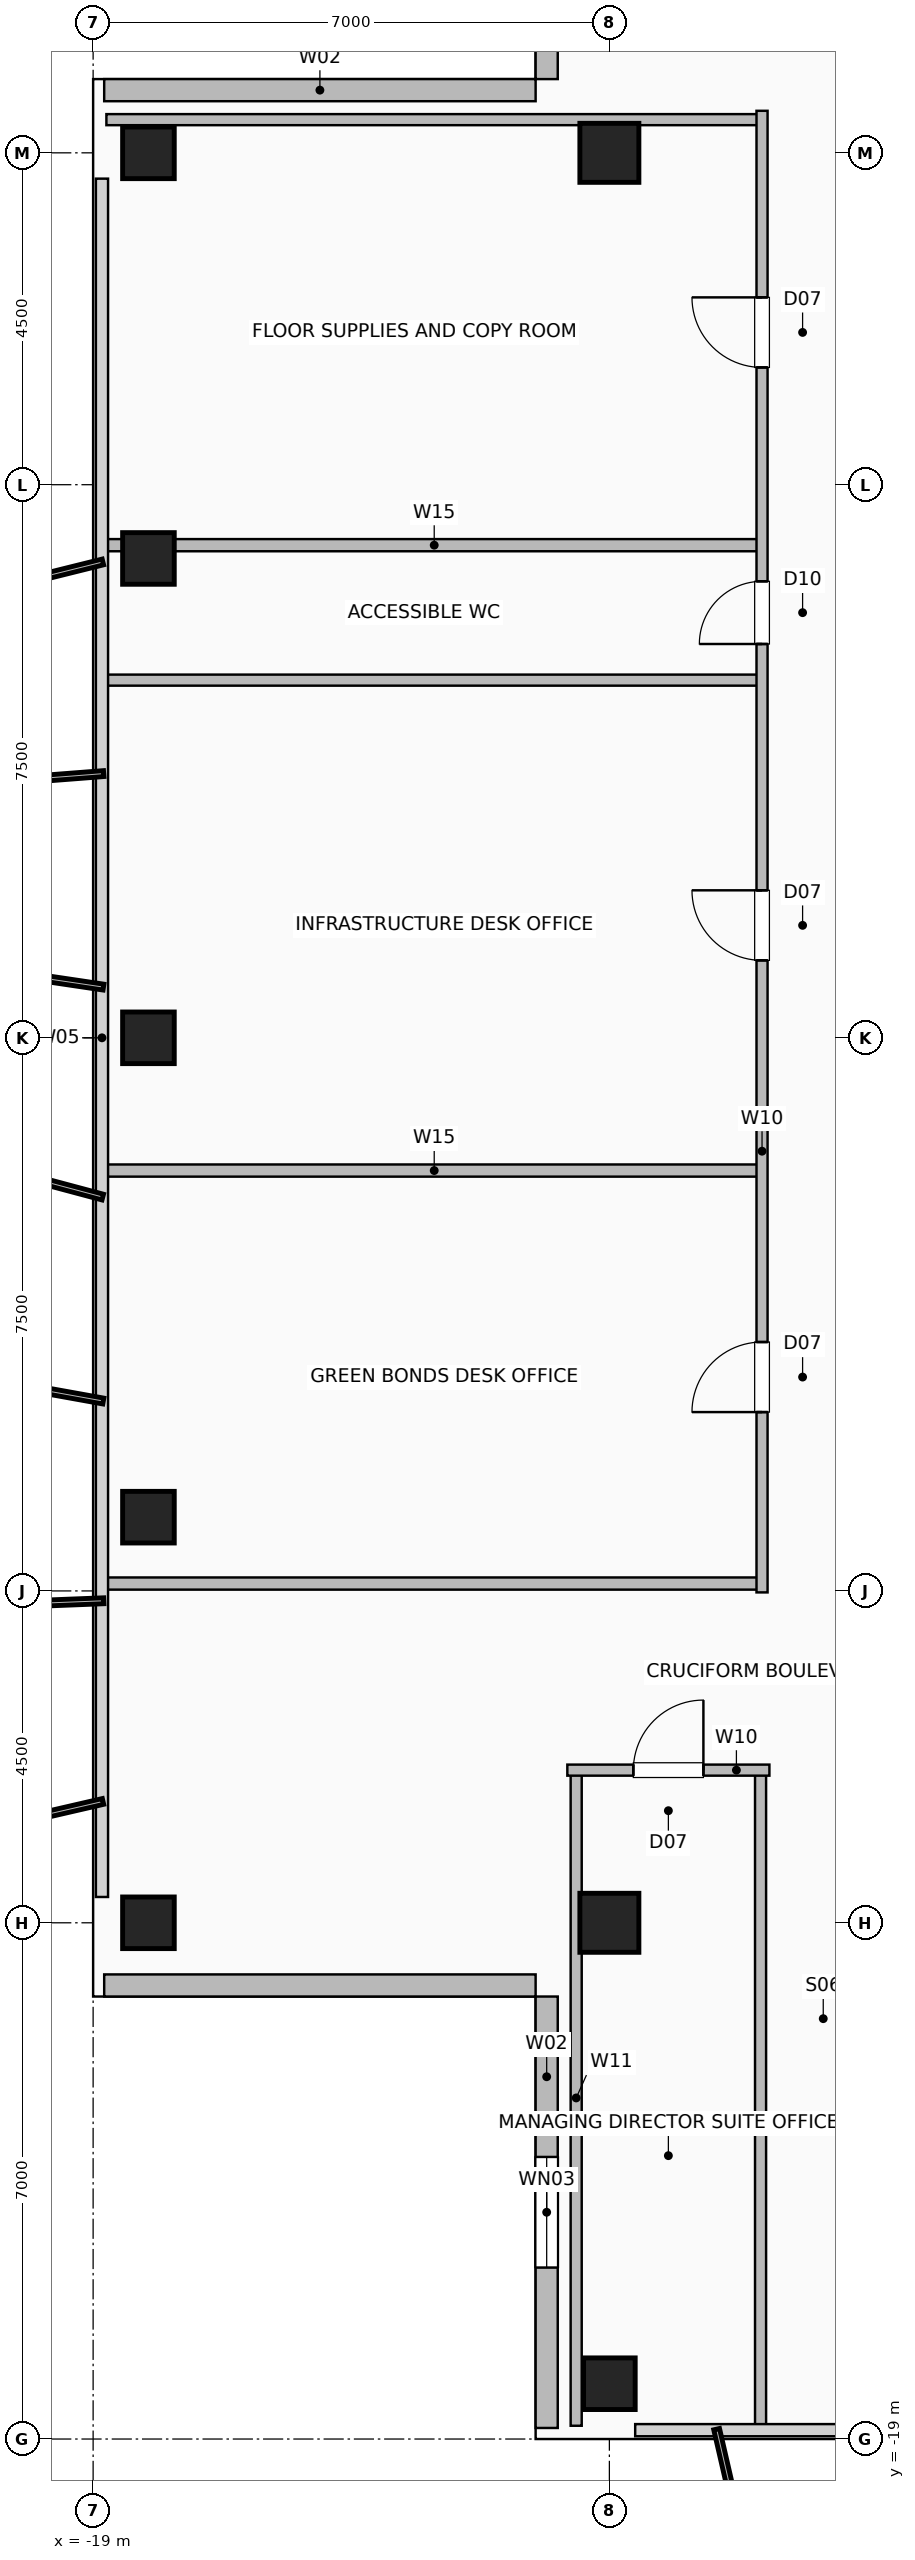
"""IFC4 building model, lengths in metres.
Left out: names, types, materials, properties, quantities, classifications, styles, units other than length and angle.
Written with IfcOpenShell. Run it as: python <this file> out.ifc"""

import sys

from ifc_helpers import new_model, si_unit, direction, frame, frame_2d, origin, origin_2d, place, context, subcontext, project, spatial, rectangle, hollow_rectangle, extrude, element, fill, save


model = new_model("IFC4")
c1 = context("Model", 3, precision=1e-05, world=origin(), true_north=direction((0.0, 1.0)))
c2 = subcontext(c1, "Body", "Model", "MODEL_VIEW")
j1 = project(units=[si_unit("LENGTHUNIT", "METRE"), si_unit("PLANEANGLEUNIT", "RADIAN")], contexts=[c1])
p1 = place(None, origin())
s1 = spatial("IfcSite", under=j1, at=p1, CompositionType="ELEMENT")
p2 = place(p1, origin())
s2 = spatial("IfcBuilding", under=s1, at=p2, CompositionType="ELEMENT")
p3 = place(p2, frame((0.0, 0.0, 282.8)))
s3 = spatial("IfcBuildingStorey", under=s2, at=p3, CompositionType="ELEMENT", Elevation=282.8)
for number, where, z_axis, x_axis in (
    (1, (-12.0, -18.25, 0.0), (0.0, 0.0, 1.0), (1.0, 0.0, 0.0)),
    (2, (-18.25, -12.0, 0.0), (0.0, 0.0, 1.0), (1.0, 0.0, 0.0)),
    (3, (-18.25, -6.5, 0.0), (0.0, 0.0, 1.0), (1.0, 0.0, 0.0)),
    (4, (-18.25, 0.0, 0.0), (0.0, 0.0, 1.0), (1.0, 0.0, 0.0)),
    (5, (-18.25, 6.5, 0.0), (0.0, 0.0, 1.0), (1.0, 0.0, 0.0)),
    (6, (-18.25, 12.0, 0.0), (0.0, 0.0, 1.0), (1.0, 0.0, 0.0)),
):
    element("IfcColumn", number, at=place(p3, frame(where, z_axis=z_axis, x_axis=x_axis)), inside=s3, PredefinedType="COLUMN", context=c2, shape_type="SweptSolid", body=[
        extrude(hollow_rectangle(XDim=0.7, YDim=0.7, WallThickness=0.035, at=origin_2d()), origin(), (0.0, 0.0, 1.0), 3.6),
    ])
for number, where, z_axis, x_axis in (
    (7, (-12.0, -12.0, 0.0), (0.0, 0.0, 1.0), (1.0, 0.0, 0.0)),
    (8, (-12.0, 12.0, 0.0), (0.0, 0.0, 1.0), (1.0, 0.0, 0.0)),
):
    element("IfcColumn", number, at=place(p3, frame(where, z_axis=z_axis, x_axis=x_axis)), inside=s3, PredefinedType="COLUMN", context=c2, shape_type="SweptSolid", body=[
        extrude(hollow_rectangle(XDim=0.8, YDim=0.8, WallThickness=0.04, at=origin_2d()), origin(), (0.0, 0.0, 1.0), 3.6),
    ])
p4 = place(p3, frame((-12.85, -18.85, 0.0), z_axis=(0.0, 0.0, 1.0), x_axis=(0.0, 1.0, 0.0)))
e9 = element("IfcWall", 9, at=p4, inside=s3, PredefinedType="SOLIDWALL", context=c2, shape_type="SweptSolid", body=[
    extrude(rectangle(XDim=5.85, YDim=0.3, at=frame_2d((2.925, 0.0))), origin(), (0.0, 0.0, 1.0), 3.36),
])
p5 = place(p4, frame((2.175, 0.0, 0.9)))
e10 = element("IfcOpeningElement", 10, at=p5, cuts=e9, PredefinedType="OPENING", context=c2, shape_type="SweptSolid", body=[
    extrude(rectangle(XDim=1.5, YDim=1.8, at=frame_2d((0.75, 0.9))), frame((0.0, 0.16, 0.0), z_axis=(0.0, -1.0, 0.0), x_axis=(1.0, 0.0, 0.0)), (0.0, 0.0, 1.0), 0.32),
])
p6 = place(p3, frame((-18.85, -12.85, 0.0), z_axis=(0.0, 0.0, 1.0), x_axis=(1.0, 0.0, 0.0)))
e11 = element("IfcWall", 11, at=p6, inside=s3, PredefinedType="SOLIDWALL", context=c2, shape_type="SweptSolid", body=[
    extrude(rectangle(XDim=5.85, YDim=0.3, at=frame_2d((2.925, 0.0))), origin(), (0.0, 0.0, 1.0), 3.36),
])
p7 = place(p3, frame((-12.85, 18.85, 0.0), z_axis=(0.0, 0.0, 1.0), x_axis=(0.0, -1.0, 0.0)))
e12 = element("IfcWall", 12, at=p7, inside=s3, PredefinedType="SOLIDWALL", context=c2, shape_type="SweptSolid", body=[
    extrude(rectangle(XDim=5.85, YDim=0.3, at=frame_2d((2.925, 0.0))), origin(), (0.0, 0.0, 1.0), 3.36),
])
p8 = place(p7, frame((2.175, 0.0, 0.9)))
e13 = element("IfcOpeningElement", 13, at=p8, cuts=e12, PredefinedType="OPENING", context=c2, shape_type="SweptSolid", body=[
    extrude(rectangle(XDim=1.5, YDim=1.8, at=frame_2d((0.75, 0.9))), frame((0.0, 0.16, 0.0), z_axis=(0.0, -1.0, 0.0), x_axis=(1.0, 0.0, 0.0)), (0.0, 0.0, 1.0), 0.32),
])
p9 = place(p3, frame((-18.85, 12.85, 0.0), z_axis=(0.0, 0.0, 1.0), x_axis=(1.0, 0.0, 0.0)))
e14 = element("IfcWall", 14, at=p9, inside=s3, PredefinedType="SOLIDWALL", context=c2, shape_type="SweptSolid", body=[
    extrude(rectangle(XDim=5.85, YDim=0.3, at=frame_2d((2.925, 0.0))), origin(), (0.0, 0.0, 1.0), 3.36),
])
for number, where, z_axis, x_axis in (
    (15, (-12.45, -18.82, 0.0), (0.0, 0.0, 1.0), (0.0, 1.0, 0.0)),
    (16, (-9.95, -18.82, 0.0), (0.0, 0.0, 1.0), (0.0, 1.0, 0.0)),
):
    element("IfcWall", number, at=place(p3, frame(where, z_axis=z_axis, x_axis=x_axis)), inside=s3, PredefinedType="PARTITIONING", context=c2, shape_type="SweptSolid", body=[
        extrude(rectangle(XDim=8.89, YDim=0.15, at=frame_2d((4.445, 0.0))), origin(), (0.0, 0.0, 1.0), 3.36),
    ])
p10 = place(p3, frame((-12.57, -9.93, 0.0), z_axis=(0.0, 0.0, 1.0), x_axis=(1.0, 0.0, 0.0)))
e17 = element("IfcWall", 17, at=p10, inside=s3, PredefinedType="PARTITIONING", context=c2, shape_type="SweptSolid", body=[
    extrude(rectangle(XDim=2.74, YDim=0.15, at=frame_2d((1.37, 0.0))), origin(), (0.0, 0.0, 1.0), 3.36),
])
p11 = place(p10, frame((0.895, 0.0, 0.0)))
e18 = element("IfcOpeningElement", 18, at=p11, cuts=e17, PredefinedType="OPENING", context=c2, shape_type="SweptSolid", body=[
    extrude(rectangle(XDim=0.95, YDim=2.06, at=frame_2d((0.475, 1.03))), frame((0.0, 0.085, 0.0), z_axis=(0.0, -1.0, 0.0), x_axis=(1.0, 0.0, 0.0)), (0.0, 0.0, 1.0), 0.17),
])
for number, where, z_axis, x_axis in (
    (19, (-18.82, 6.68, 0.0), (0.0, 0.0, 1.0), (1.0, 0.0, 0.0)),
    (20, (-18.82, -7.4, 0.0), (0.0, 0.0, 1.0), (1.0, 0.0, 0.0)),
    (21, (-18.82, -1.8, 0.0), (0.0, 0.0, 1.0), (1.0, 0.0, 0.0)),
):
    element("IfcWall", number, at=place(p3, frame(where, z_axis=z_axis, x_axis=x_axis)), inside=s3, PredefinedType="PLUMBINGWALL", context=c2, shape_type="SweptSolid", body=[
        extrude(rectangle(XDim=8.89, YDim=0.165, at=frame_2d((4.445, 0.0))), origin(), (0.0, 0.0, 1.0), 3.36),
    ])
for number, where, z_axis, x_axis in (
    (22, (-18.82, 4.85, 0.0), (0.0, 0.0, 1.0), (1.0, 0.0, 0.0)),
    (23, (-18.82, 12.45, 0.0), (0.0, 0.0, 1.0), (1.0, 0.0, 0.0)),
):
    element("IfcWall", number, at=place(p3, frame(where, z_axis=z_axis, x_axis=x_axis)), inside=s3, PredefinedType="PARTITIONING", context=c2, shape_type="SweptSolid", body=[
        extrude(rectangle(XDim=8.89, YDim=0.15, at=frame_2d((4.445, 0.0))), origin(), (0.0, 0.0, 1.0), 3.36),
    ])
p12 = place(p3, frame((-9.93, -7.52, 0.0), z_axis=(0.0, 0.0, 1.0), x_axis=(0.0, 1.0, 0.0)))
e24 = element("IfcWall", 24, at=p12, inside=s3, PredefinedType="PARTITIONING", context=c2, shape_type="SweptSolid", body=[
    extrude(rectangle(XDim=20.09, YDim=0.15, at=frame_2d((10.045, 0.0))), origin(), (0.0, 0.0, 1.0), 3.36),
])
p13 = place(p12, frame((2.445, 0.0, 0.0)))
e25 = element("IfcOpeningElement", 25, at=p13, cuts=e24, PredefinedType="OPENING", context=c2, shape_type="SweptSolid", body=[
    extrude(rectangle(XDim=0.95, YDim=2.06, at=frame_2d((0.475, 1.03))), frame((0.0, 0.085, 0.0), z_axis=(0.0, -1.0, 0.0), x_axis=(1.0, 0.0, 0.0)), (0.0, 0.0, 1.0), 0.17),
])
p14 = place(p12, frame((8.57, 0.0, 0.0)))
e26 = element("IfcOpeningElement", 26, at=p14, cuts=e24, PredefinedType="OPENING", context=c2, shape_type="SweptSolid", body=[
    extrude(rectangle(XDim=0.95, YDim=2.06, at=frame_2d((0.475, 1.03))), frame((0.0, 0.085, 0.0), z_axis=(0.0, -1.0, 0.0), x_axis=(1.0, 0.0, 0.0)), (0.0, 0.0, 1.0), 0.17),
])
p15 = place(p12, frame((12.86, 0.0, 0.0)))
e27 = element("IfcOpeningElement", 27, at=p15, cuts=e24, PredefinedType="OPENING", context=c2, shape_type="SweptSolid", body=[
    extrude(rectangle(XDim=0.85, YDim=2.05, at=frame_2d((0.425, 1.025))), frame((0.0, 0.085, 0.0), z_axis=(0.0, -1.0, 0.0), x_axis=(1.0, 0.0, 0.0)), (0.0, 0.0, 1.0), 0.17),
])
p16 = place(p12, frame((16.61, 0.0, 0.0)))
e28 = element("IfcOpeningElement", 28, at=p16, cuts=e24, PredefinedType="OPENING", context=c2, shape_type="SweptSolid", body=[
    extrude(rectangle(XDim=0.95, YDim=2.06, at=frame_2d((0.475, 1.03))), frame((0.0, 0.085, 0.0), z_axis=(0.0, -1.0, 0.0), x_axis=(1.0, 0.0, 0.0)), (0.0, 0.0, 1.0), 0.17),
])
p17 = place(p5, origin())
e29 = element("IfcWindow", 29, at=p17, inside=s3, PartitioningType="SINGLE_PANEL", PredefinedType="WINDOW", context=c2, shape_type="SweptSolid", body=[
    extrude(rectangle(XDim=1.5, YDim=1.8, at=frame_2d((0.75, 0.9))), frame((0.0, 0.03, 0.0), z_axis=(0.0, -1.0, 0.0), x_axis=(1.0, 0.0, 0.0)), (0.0, 0.0, 1.0), 0.06),
])
fill(e10, e29)
p18 = place(p11, origin())
e30 = element("IfcDoor", 30, at=p18, inside=s3, OperationType="SINGLE_SWING_RIGHT", PredefinedType="DOOR", context=c2, shape_type="SweptSolid", body=[
    extrude(rectangle(XDim=0.95, YDim=2.06, at=frame_2d((0.475, 1.03))), frame((0.0, 0.025, 0.0), z_axis=(0.0, -1.0, 0.0), x_axis=(1.0, 0.0, 0.0)), (0.0, 0.0, 1.0), 0.05),
])
fill(e18, e30)
p19 = place(p13, origin())
e31 = element("IfcDoor", 31, at=p19, inside=s3, OperationType="SINGLE_SWING_LEFT", PredefinedType="DOOR", context=c2, shape_type="SweptSolid", body=[
    extrude(rectangle(XDim=0.95, YDim=2.06, at=frame_2d((0.475, 1.03))), frame((0.0, 0.025, 0.0), z_axis=(0.0, -1.0, 0.0), x_axis=(1.0, 0.0, 0.0)), (0.0, 0.0, 1.0), 0.05),
])
fill(e25, e31)
p20 = place(p14, origin())
e32 = element("IfcDoor", 32, at=p20, inside=s3, OperationType="SINGLE_SWING_RIGHT", PredefinedType="DOOR", context=c2, shape_type="SweptSolid", body=[
    extrude(rectangle(XDim=0.95, YDim=2.06, at=frame_2d((0.475, 1.03))), frame((0.0, 0.025, 0.0), z_axis=(0.0, -1.0, 0.0), x_axis=(1.0, 0.0, 0.0)), (0.0, 0.0, 1.0), 0.05),
])
fill(e26, e32)
p21 = place(p15, origin())
e33 = element("IfcDoor", 33, at=p21, inside=s3, OperationType="SINGLE_SWING_LEFT", PredefinedType="DOOR", context=c2, shape_type="SweptSolid", body=[
    extrude(rectangle(XDim=0.85, YDim=2.05, at=frame_2d((0.425, 1.025))), frame((0.0, 0.025, 0.0), z_axis=(0.0, -1.0, 0.0), x_axis=(1.0, 0.0, 0.0)), (0.0, 0.0, 1.0), 0.05),
])
fill(e27, e33)
p22 = place(p16, origin())
e34 = element("IfcDoor", 34, at=p22, inside=s3, OperationType="SINGLE_SWING_RIGHT", PredefinedType="DOOR", context=c2, shape_type="SweptSolid", body=[
    extrude(rectangle(XDim=0.95, YDim=2.06, at=frame_2d((0.475, 1.03))), frame((0.0, 0.025, 0.0), z_axis=(0.0, -1.0, 0.0), x_axis=(1.0, 0.0, 0.0)), (0.0, 0.0, 1.0), 0.05),
])
fill(e28, e34)
save(model, sys.argv[1])
